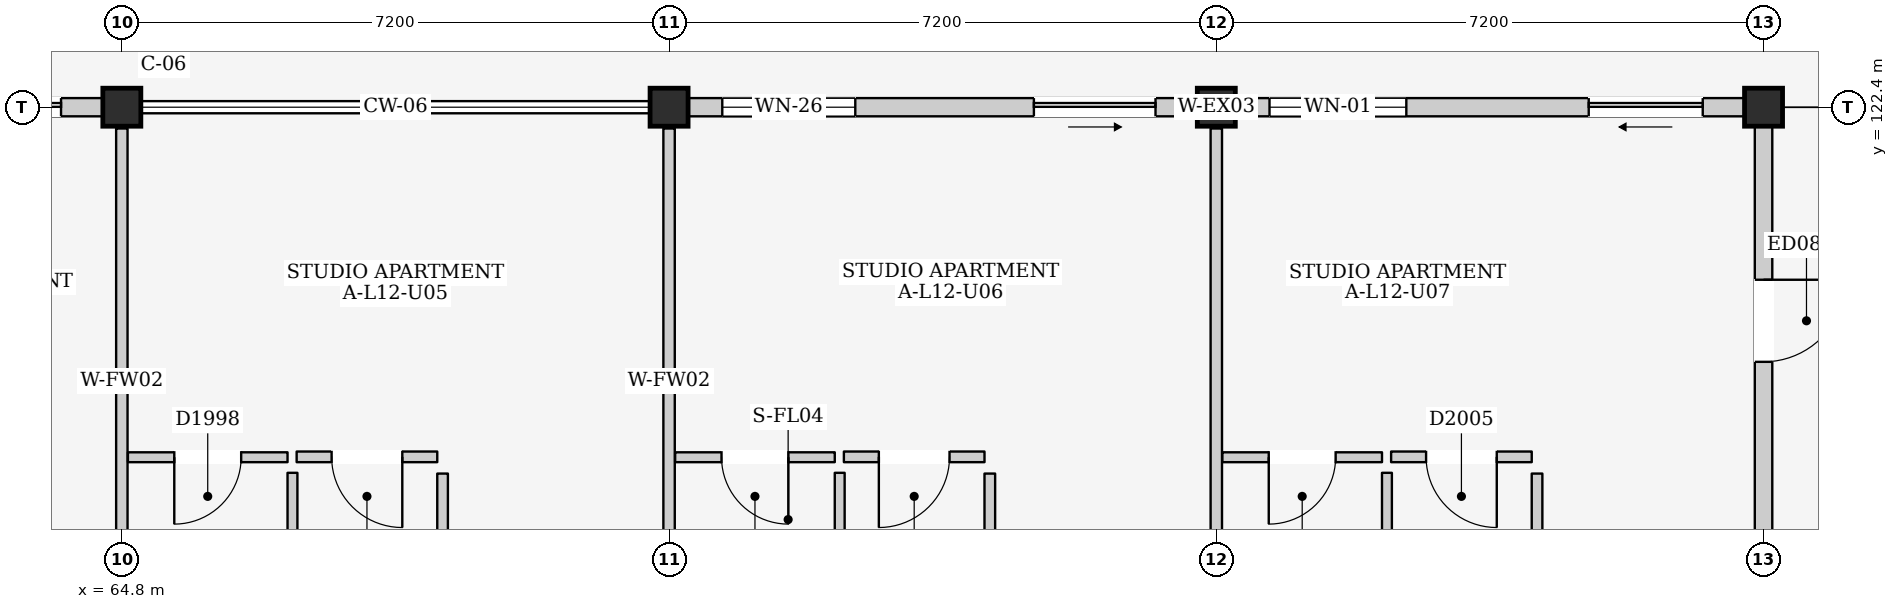
"""IFC4 building model, lengths in metres.
Left out: names, types, materials, properties, quantities, classifications, styles, units other than length and angle.
Written with IfcOpenShell. Run it as: python <this file> out.ifc"""

import sys

from ifc_helpers import new_model, si_unit, direction, frame, frame_2d, origin, origin_2d, place, context, subcontext, project, spatial, rectangle, extrude, element, fill, save


model = new_model("IFC4")
c1 = context("Model", 3, precision=1e-05, world=origin(), true_north=direction((0.0, 1.0)))
c2 = subcontext(c1, "Body", "Model", "MODEL_VIEW")
j1 = project(units=[si_unit("LENGTHUNIT", "METRE"), si_unit("PLANEANGLEUNIT", "RADIAN")], contexts=[c1])
p1 = place(None, origin())
s1 = spatial("IfcSite", under=j1, at=p1, CompositionType="ELEMENT")
p2 = place(p1, origin())
s2 = spatial("IfcBuilding", under=s1, at=p2, CompositionType="ELEMENT")
p3 = place(p2, frame((0.0, 0.0, 41.2)))
s3 = spatial("IfcBuildingStorey", under=s2, at=p3, CompositionType="ELEMENT", Elevation=41.2)
for number, where, z_axis, x_axis in (
    (1, (64.8, 122.4, 0.0), (0.0, 0.0, 1.0), (1.0, 0.0, 0.0)),
    (2, (72.0, 122.4, 0.0), (0.0, 0.0, 1.0), (1.0, 0.0, 0.0)),
    (3, (79.2, 122.4, 0.0), (0.0, 0.0, 1.0), (1.0, 0.0, 0.0)),
    (4, (86.4, 122.4, 0.0), (0.0, 0.0, 1.0), (1.0, 0.0, 0.0)),
):
    element("IfcColumn", number, at=place(p3, frame(where, z_axis=z_axis, x_axis=x_axis)), inside=s3, PredefinedType="COLUMN", context=c2, shape_type="SweptSolid", body=[
        extrude(rectangle(XDim=0.5, YDim=0.5, at=origin_2d()), origin(), (0.0, 0.0, 1.0), 3.2),
    ])
p4 = place(p3, frame((57.85, 122.4, 0.0), z_axis=(0.0, 0.0, 1.0), x_axis=(1.0, 0.0, 0.0)))
e5 = element("IfcWall", 5, at=p4, inside=s3, PredefinedType="ELEMENTEDWALL", context=c2, shape_type="SweptSolid", body=[
    extrude(rectangle(XDim=6.7, YDim=0.24, at=frame_2d((3.35, 0.0))), origin(), (0.0, 0.0, 1.0), 2.485),
])
p5 = place(p4, frame((4.75, 0.0, 0.0)))
e6 = element("IfcOpeningElement", 6, at=p5, cuts=e5, PredefinedType="OPENING", context=c2, shape_type="SweptSolid", body=[
    extrude(rectangle(XDim=1.4, YDim=2.1, at=frame_2d((0.7, 1.05))), frame((0.0, 0.135, 0.0), z_axis=(0.0, -1.0, 0.0), x_axis=(1.0, 0.0, 0.0)), (0.0, 0.0, 1.0), 0.27),
])
p6 = place(p4, frame((0.45, 0.0, 0.9)))
e7 = element("IfcOpeningElement", 7, at=p6, cuts=e5, PredefinedType="OPENING", context=c2, shape_type="SweptSolid", body=[
    extrude(rectangle(XDim=1.3, YDim=1.25, at=frame_2d((0.65, 0.625))), frame((0.0, 0.135, 0.0), z_axis=(0.0, -1.0, 0.0), x_axis=(1.0, 0.0, 0.0)), (0.0, 0.0, 1.0), 0.27),
])
p7 = place(p3, frame((72.25, 122.4, 0.0), z_axis=(0.0, 0.0, 1.0), x_axis=(1.0, 0.0, 0.0)))
e8 = element("IfcWall", 8, at=p7, inside=s3, PredefinedType="ELEMENTEDWALL", context=c2, shape_type="SweptSolid", body=[
    extrude(rectangle(XDim=6.7, YDim=0.24, at=frame_2d((3.35, 0.0))), origin(), (0.0, 0.0, 1.0), 2.485),
])
p8 = place(p7, frame((4.55, 0.0, 0.0)))
e9 = element("IfcOpeningElement", 9, at=p8, cuts=e8, PredefinedType="OPENING", context=c2, shape_type="SweptSolid", body=[
    extrude(rectangle(XDim=1.6, YDim=2.12, at=frame_2d((0.8, 1.06))), frame((0.0, 0.135, 0.0), z_axis=(0.0, -1.0, 0.0), x_axis=(1.0, 0.0, 0.0)), (0.0, 0.0, 1.0), 0.27),
])
p9 = place(p7, frame((0.45, 0.0, 0.825)))
e10 = element("IfcOpeningElement", 10, at=p9, cuts=e8, PredefinedType="OPENING", context=c2, shape_type="SweptSolid", body=[
    extrude(rectangle(XDim=1.75, YDim=1.55, at=frame_2d((0.875, 0.775))), frame((0.0, 0.135, 0.0), z_axis=(0.0, -1.0, 0.0), x_axis=(1.0, 0.0, 0.0)), (0.0, 0.0, 1.0), 0.27),
])
p10 = place(p3, frame((79.45, 122.4, 0.0), z_axis=(0.0, 0.0, 1.0), x_axis=(1.0, 0.0, 0.0)))
e11 = element("IfcWall", 11, at=p10, inside=s3, PredefinedType="ELEMENTEDWALL", context=c2, shape_type="SweptSolid", body=[
    extrude(rectangle(XDim=6.7, YDim=0.24, at=frame_2d((3.35, 0.0))), origin(), (0.0, 0.0, 1.0), 2.485),
])
p11 = place(p10, frame((4.65, 0.0, 0.0)))
e12 = element("IfcOpeningElement", 12, at=p11, cuts=e11, PredefinedType="OPENING", context=c2, shape_type="SweptSolid", body=[
    extrude(rectangle(XDim=1.5, YDim=2.12, at=frame_2d((0.75, 1.06))), frame((0.0, 0.135, 0.0), z_axis=(0.0, -1.0, 0.0), x_axis=(1.0, 0.0, 0.0)), (0.0, 0.0, 1.0), 0.27),
])
p12 = place(p10, frame((0.45, 0.0, 0.875)))
e13 = element("IfcOpeningElement", 13, at=p12, cuts=e11, PredefinedType="OPENING", context=c2, shape_type="SweptSolid", body=[
    extrude(rectangle(XDim=1.8, YDim=1.5, at=frame_2d((0.9, 0.75))), frame((0.0, 0.135, 0.0), z_axis=(0.0, -1.0, 0.0), x_axis=(1.0, 0.0, 0.0)), (0.0, 0.0, 1.0), 0.27),
])
p13 = place(p3, frame((86.4, 115.45, 0.0), z_axis=(0.0, 0.0, 1.0), x_axis=(0.0, 1.0, 0.0)))
e14 = element("IfcWall", 14, at=p13, inside=s3, PredefinedType="ELEMENTEDWALL", context=c2, shape_type="SweptSolid", body=[
    extrude(rectangle(XDim=6.7, YDim=0.23, at=frame_2d((3.35, 0.0))), origin(), (0.0, 0.0, 1.0), 2.435),
])
p14 = place(p13, frame((3.6, 0.0, 0.0)))
e15 = element("IfcOpeningElement", 15, at=p14, cuts=e14, PredefinedType="OPENING", context=c2, shape_type="SweptSolid", body=[
    extrude(rectangle(XDim=1.08, YDim=2.12, at=frame_2d((0.54, 1.06))), frame((0.0, 0.13, 0.0), z_axis=(0.0, -1.0, 0.0), x_axis=(1.0, 0.0, 0.0)), (0.0, 0.0, 1.0), 0.26),
])
for number, where, z_axis, x_axis in (
    (16, (64.8, 115.48, 0.0), (0.0, 0.0, 1.0), (0.0, 1.0, 0.0)),
    (17, (72.0, 115.48, 0.0), (0.0, 0.0, 1.0), (0.0, 1.0, 0.0)),
):
    element("IfcWall", number, at=place(p3, frame(where, z_axis=z_axis, x_axis=x_axis)), inside=s3, PredefinedType="PARTITIONING", context=c2, shape_type="SweptSolid", body=[
        extrude(rectangle(XDim=6.64, YDim=0.15, at=frame_2d((3.32, 0.0))), origin(), (0.0, 0.0, 1.0), 2.435),
    ])
p15 = place(p3, frame((64.88, 117.795, 0.0), z_axis=(0.0, 0.0, 1.0), x_axis=(1.0, 0.0, 0.0)))
e18 = element("IfcWall", 18, at=p15, inside=s3, PredefinedType="PARTITIONING", context=c2, shape_type="SweptSolid", body=[
    extrude(rectangle(XDim=2.1, YDim=0.13, at=frame_2d((1.05, 0.0))), origin(), (0.0, 0.0, 1.0), 2.95),
])
p16 = place(p15, frame((0.61, 0.0, 0.0)))
e19 = element("IfcOpeningElement", 19, at=p16, cuts=e18, PredefinedType="OPENING", context=c2, shape_type="SweptSolid", body=[
    extrude(rectangle(XDim=0.88, YDim=2.1, at=frame_2d((0.44, 1.05))), frame((0.0, 0.08, 0.0), z_axis=(0.0, -1.0, 0.0), x_axis=(1.0, 0.0, 0.0)), (0.0, 0.0, 1.0), 0.16),
])
p17 = place(p3, frame((67.045, 115.46, 0.0), z_axis=(0.0, 0.0, 1.0), x_axis=(0.0, 1.0, 0.0)))
e20 = element("IfcWall", 20, at=p17, inside=s3, PredefinedType="PARTITIONING", context=c2, shape_type="SweptSolid", body=[
    extrude(rectangle(XDim=2.13, YDim=0.13, at=frame_2d((1.065, 0.0))), origin(), (0.0, 0.0, 1.0), 2.95),
])
p18 = place(p3, frame((67.1, 117.8, 0.0), z_axis=(0.0, 0.0, 1.0), x_axis=(1.0, 0.0, 0.0)))
e21 = element("IfcWall", 21, at=p18, inside=s3, PredefinedType="PARTITIONING", context=c2, shape_type="SweptSolid", body=[
    extrude(rectangle(XDim=1.85, YDim=0.14, at=frame_2d((0.925, 0.0))), origin(), (0.0, 0.0, 1.0), 2.95),
])
p19 = place(p18, frame((0.46, 0.0, 0.0)))
e22 = element("IfcOpeningElement", 22, at=p19, cuts=e21, PredefinedType="OPENING", context=c2, shape_type="SweptSolid", body=[
    extrude(rectangle(XDim=0.93, YDim=2.14, at=frame_2d((0.465, 1.07))), frame((0.0, 0.085, 0.0), z_axis=(0.0, -1.0, 0.0), x_axis=(1.0, 0.0, 0.0)), (0.0, 0.0, 1.0), 0.17),
])
p20 = place(p3, frame((69.02, 115.43, 0.0), z_axis=(0.0, 0.0, 1.0), x_axis=(0.0, 1.0, 0.0)))
e23 = element("IfcWall", 23, at=p20, inside=s3, PredefinedType="PARTITIONING", context=c2, shape_type="SweptSolid", body=[
    extrude(rectangle(XDim=2.15, YDim=0.14, at=frame_2d((1.075, 0.0))), origin(), (0.0, 0.0, 1.0), 2.95),
])
p21 = place(p3, frame((79.2, 115.48, 0.0), z_axis=(0.0, 0.0, 1.0), x_axis=(0.0, 1.0, 0.0)))
e24 = element("IfcWall", 24, at=p21, inside=s3, PredefinedType="PARTITIONING", context=c2, shape_type="SweptSolid", body=[
    extrude(rectangle(XDim=6.64, YDim=0.15, at=frame_2d((3.32, 0.0))), origin(), (0.0, 0.0, 1.0), 2.435),
])
p22 = place(p3, frame((72.08, 117.795, 0.0), z_axis=(0.0, 0.0, 1.0), x_axis=(1.0, 0.0, 0.0)))
e25 = element("IfcWall", 25, at=p22, inside=s3, PredefinedType="PARTITIONING", context=c2, shape_type="SweptSolid", body=[
    extrude(rectangle(XDim=2.1, YDim=0.13, at=frame_2d((1.05, 0.0))), origin(), (0.0, 0.0, 1.0), 2.95),
])
p23 = place(p22, frame((0.61, 0.0, 0.0)))
e26 = element("IfcOpeningElement", 26, at=p23, cuts=e25, PredefinedType="OPENING", context=c2, shape_type="SweptSolid", body=[
    extrude(rectangle(XDim=0.88, YDim=2.1, at=frame_2d((0.44, 1.05))), frame((0.0, 0.08, 0.0), z_axis=(0.0, -1.0, 0.0), x_axis=(1.0, 0.0, 0.0)), (0.0, 0.0, 1.0), 0.16),
])
p24 = place(p3, frame((74.245, 115.46, 0.0), z_axis=(0.0, 0.0, 1.0), x_axis=(0.0, 1.0, 0.0)))
e27 = element("IfcWall", 27, at=p24, inside=s3, PredefinedType="PARTITIONING", context=c2, shape_type="SweptSolid", body=[
    extrude(rectangle(XDim=2.13, YDim=0.13, at=frame_2d((1.065, 0.0))), origin(), (0.0, 0.0, 1.0), 2.95),
])
p25 = place(p3, frame((74.3, 117.8, 0.0), z_axis=(0.0, 0.0, 1.0), x_axis=(1.0, 0.0, 0.0)))
e28 = element("IfcWall", 28, at=p25, inside=s3, PredefinedType="PARTITIONING", context=c2, shape_type="SweptSolid", body=[
    extrude(rectangle(XDim=1.85, YDim=0.14, at=frame_2d((0.925, 0.0))), origin(), (0.0, 0.0, 1.0), 2.95),
])
p26 = place(p25, frame((0.46, 0.0, 0.0)))
e29 = element("IfcOpeningElement", 29, at=p26, cuts=e28, PredefinedType="OPENING", context=c2, shape_type="SweptSolid", body=[
    extrude(rectangle(XDim=0.93, YDim=2.14, at=frame_2d((0.465, 1.07))), frame((0.0, 0.085, 0.0), z_axis=(0.0, -1.0, 0.0), x_axis=(1.0, 0.0, 0.0)), (0.0, 0.0, 1.0), 0.17),
])
p27 = place(p3, frame((76.22, 115.43, 0.0), z_axis=(0.0, 0.0, 1.0), x_axis=(0.0, 1.0, 0.0)))
e30 = element("IfcWall", 30, at=p27, inside=s3, PredefinedType="PARTITIONING", context=c2, shape_type="SweptSolid", body=[
    extrude(rectangle(XDim=2.15, YDim=0.14, at=frame_2d((1.075, 0.0))), origin(), (0.0, 0.0, 1.0), 2.95),
])
p28 = place(p3, frame((79.28, 117.795, 0.0), z_axis=(0.0, 0.0, 1.0), x_axis=(1.0, 0.0, 0.0)))
e31 = element("IfcWall", 31, at=p28, inside=s3, PredefinedType="PARTITIONING", context=c2, shape_type="SweptSolid", body=[
    extrude(rectangle(XDim=2.1, YDim=0.13, at=frame_2d((1.05, 0.0))), origin(), (0.0, 0.0, 1.0), 2.95),
])
p29 = place(p28, frame((0.61, 0.0, 0.0)))
e32 = element("IfcOpeningElement", 32, at=p29, cuts=e31, PredefinedType="OPENING", context=c2, shape_type="SweptSolid", body=[
    extrude(rectangle(XDim=0.88, YDim=2.1, at=frame_2d((0.44, 1.05))), frame((0.0, 0.08, 0.0), z_axis=(0.0, -1.0, 0.0), x_axis=(1.0, 0.0, 0.0)), (0.0, 0.0, 1.0), 0.16),
])
p30 = place(p3, frame((81.445, 115.46, 0.0), z_axis=(0.0, 0.0, 1.0), x_axis=(0.0, 1.0, 0.0)))
e33 = element("IfcWall", 33, at=p30, inside=s3, PredefinedType="PARTITIONING", context=c2, shape_type="SweptSolid", body=[
    extrude(rectangle(XDim=2.13, YDim=0.13, at=frame_2d((1.065, 0.0))), origin(), (0.0, 0.0, 1.0), 2.95),
])
p31 = place(p3, frame((81.5, 117.8, 0.0), z_axis=(0.0, 0.0, 1.0), x_axis=(1.0, 0.0, 0.0)))
e34 = element("IfcWall", 34, at=p31, inside=s3, PredefinedType="PARTITIONING", context=c2, shape_type="SweptSolid", body=[
    extrude(rectangle(XDim=1.85, YDim=0.14, at=frame_2d((0.925, 0.0))), origin(), (0.0, 0.0, 1.0), 2.95),
])
p32 = place(p31, frame((0.46, 0.0, 0.0)))
e35 = element("IfcOpeningElement", 35, at=p32, cuts=e34, PredefinedType="OPENING", context=c2, shape_type="SweptSolid", body=[
    extrude(rectangle(XDim=0.93, YDim=2.14, at=frame_2d((0.465, 1.07))), frame((0.0, 0.085, 0.0), z_axis=(0.0, -1.0, 0.0), x_axis=(1.0, 0.0, 0.0)), (0.0, 0.0, 1.0), 0.17),
])
p33 = place(p3, frame((83.42, 115.43, 0.0), z_axis=(0.0, 0.0, 1.0), x_axis=(0.0, 1.0, 0.0)))
e36 = element("IfcWall", 36, at=p33, inside=s3, PredefinedType="PARTITIONING", context=c2, shape_type="SweptSolid", body=[
    extrude(rectangle(XDim=2.15, YDim=0.14, at=frame_2d((1.075, 0.0))), origin(), (0.0, 0.0, 1.0), 2.95),
])
p34 = place(p5, frame((1.4, 0.0, 0.0), z_axis=(0.0, 0.0, 1.0), x_axis=(-1.0, 0.0, 0.0)))
e37 = element("IfcDoor", 37, at=p34, inside=s3, OperationType="SLIDING_TO_RIGHT", PredefinedType="DOOR", context=c2, shape_type="SweptSolid", body=[
    extrude(rectangle(XDim=1.4, YDim=2.1, at=frame_2d((0.7, 1.05))), frame((0.0, 0.025, 0.0), z_axis=(0.0, -1.0, 0.0), x_axis=(1.0, 0.0, 0.0)), (0.0, 0.0, 1.0), 0.05),
])
fill(e6, e37)
p35 = place(p8, frame((1.6, 0.0, 0.0), z_axis=(0.0, 0.0, 1.0), x_axis=(-1.0, 0.0, 0.0)))
e38 = element("IfcDoor", 38, at=p35, inside=s3, OperationType="SLIDING_TO_RIGHT", PredefinedType="DOOR", context=c2, shape_type="SweptSolid", body=[
    extrude(rectangle(XDim=1.6, YDim=2.12, at=frame_2d((0.8, 1.06))), frame((0.0, 0.025, 0.0), z_axis=(0.0, -1.0, 0.0), x_axis=(1.0, 0.0, 0.0)), (0.0, 0.0, 1.0), 0.05),
])
fill(e9, e38)
p36 = place(p9, origin())
e39 = element("IfcWindow", 39, at=p36, inside=s3, PartitioningType="DOUBLE_PANEL_VERTICAL", PredefinedType="WINDOW", context=c2, shape_type="SweptSolid", body=[
    extrude(rectangle(XDim=1.75, YDim=1.55, at=frame_2d((0.875, 0.775))), frame((0.0, 0.03, 0.0), z_axis=(0.0, -1.0, 0.0), x_axis=(1.0, 0.0, 0.0)), (0.0, 0.0, 1.0), 0.06),
])
fill(e10, e39)
p37 = place(p11, frame((1.5, 0.0, 0.0), z_axis=(0.0, 0.0, 1.0), x_axis=(-1.0, 0.0, 0.0)))
e40 = element("IfcDoor", 40, at=p37, inside=s3, OperationType="SLIDING_TO_LEFT", PredefinedType="DOOR", context=c2, shape_type="SweptSolid", body=[
    extrude(rectangle(XDim=1.5, YDim=2.12, at=frame_2d((0.75, 1.06))), frame((0.0, 0.025, 0.0), z_axis=(0.0, -1.0, 0.0), x_axis=(1.0, 0.0, 0.0)), (0.0, 0.0, 1.0), 0.05),
])
fill(e12, e40)
p38 = place(p12, origin())
e41 = element("IfcWindow", 41, at=p38, inside=s3, PartitioningType="DOUBLE_PANEL_VERTICAL", PredefinedType="WINDOW", context=c2, shape_type="SweptSolid", body=[
    extrude(rectangle(XDim=1.8, YDim=1.5, at=frame_2d((0.9, 0.75))), frame((0.0, 0.03, 0.0), z_axis=(0.0, -1.0, 0.0), x_axis=(1.0, 0.0, 0.0)), (0.0, 0.0, 1.0), 0.06),
])
fill(e13, e41)
p39 = place(p14, frame((1.08, 0.0, 0.0), z_axis=(0.0, 0.0, 1.0), x_axis=(-1.0, 0.0, 0.0)))
e42 = element("IfcDoor", 42, at=p39, inside=s3, OperationType="SINGLE_SWING_LEFT", PredefinedType="DOOR", context=c2, shape_type="SweptSolid", body=[
    extrude(rectangle(XDim=1.08, YDim=2.12, at=frame_2d((0.54, 1.06))), frame((0.0, 0.025, 0.0), z_axis=(0.0, -1.0, 0.0), x_axis=(1.0, 0.0, 0.0)), (0.0, 0.0, 1.0), 0.05),
])
fill(e15, e42)
p40 = place(p16, frame((0.88, 0.0, 0.0), z_axis=(0.0, 0.0, 1.0), x_axis=(-1.0, 0.0, 0.0)))
e43 = element("IfcDoor", 43, at=p40, inside=s3, OperationType="SINGLE_SWING_RIGHT", PredefinedType="DOOR", context=c2, shape_type="SweptSolid", body=[
    extrude(rectangle(XDim=0.88, YDim=2.1, at=frame_2d((0.44, 1.05))), frame((0.0, 0.025, 0.0), z_axis=(0.0, -1.0, 0.0), x_axis=(1.0, 0.0, 0.0)), (0.0, 0.0, 1.0), 0.05),
])
fill(e19, e43)
p41 = place(p19, frame((0.93, 0.0, 0.0), z_axis=(0.0, 0.0, 1.0), x_axis=(-1.0, 0.0, 0.0)))
e44 = element("IfcDoor", 44, at=p41, inside=s3, OperationType="SINGLE_SWING_LEFT", PredefinedType="DOOR", context=c2, shape_type="SweptSolid", body=[
    extrude(rectangle(XDim=0.93, YDim=2.14, at=frame_2d((0.465, 1.07))), frame((0.0, 0.025, 0.0), z_axis=(0.0, -1.0, 0.0), x_axis=(1.0, 0.0, 0.0)), (0.0, 0.0, 1.0), 0.05),
])
fill(e22, e44)
p42 = place(p23, frame((0.88, 0.0, 0.0), z_axis=(0.0, 0.0, 1.0), x_axis=(-1.0, 0.0, 0.0)))
e45 = element("IfcDoor", 45, at=p42, inside=s3, OperationType="SINGLE_SWING_LEFT", PredefinedType="DOOR", context=c2, shape_type="SweptSolid", body=[
    extrude(rectangle(XDim=0.88, YDim=2.1, at=frame_2d((0.44, 1.05))), frame((0.0, 0.025, 0.0), z_axis=(0.0, -1.0, 0.0), x_axis=(1.0, 0.0, 0.0)), (0.0, 0.0, 1.0), 0.05),
])
fill(e26, e45)
p43 = place(p26, frame((0.93, 0.0, 0.0), z_axis=(0.0, 0.0, 1.0), x_axis=(-1.0, 0.0, 0.0)))
e46 = element("IfcDoor", 46, at=p43, inside=s3, OperationType="SINGLE_SWING_RIGHT", PredefinedType="DOOR", context=c2, shape_type="SweptSolid", body=[
    extrude(rectangle(XDim=0.93, YDim=2.14, at=frame_2d((0.465, 1.07))), frame((0.0, 0.025, 0.0), z_axis=(0.0, -1.0, 0.0), x_axis=(1.0, 0.0, 0.0)), (0.0, 0.0, 1.0), 0.05),
])
fill(e29, e46)
p44 = place(p29, frame((0.88, 0.0, 0.0), z_axis=(0.0, 0.0, 1.0), x_axis=(-1.0, 0.0, 0.0)))
e47 = element("IfcDoor", 47, at=p44, inside=s3, OperationType="SINGLE_SWING_RIGHT", PredefinedType="DOOR", context=c2, shape_type="SweptSolid", body=[
    extrude(rectangle(XDim=0.88, YDim=2.1, at=frame_2d((0.44, 1.05))), frame((0.0, 0.025, 0.0), z_axis=(0.0, -1.0, 0.0), x_axis=(1.0, 0.0, 0.0)), (0.0, 0.0, 1.0), 0.05),
])
fill(e32, e47)
p45 = place(p32, frame((0.93, 0.0, 0.0), z_axis=(0.0, 0.0, 1.0), x_axis=(-1.0, 0.0, 0.0)))
e48 = element("IfcDoor", 48, at=p45, inside=s3, OperationType="SINGLE_SWING_LEFT", PredefinedType="DOOR", context=c2, shape_type="SweptSolid", body=[
    extrude(rectangle(XDim=0.93, YDim=2.14, at=frame_2d((0.465, 1.07))), frame((0.0, 0.025, 0.0), z_axis=(0.0, -1.0, 0.0), x_axis=(1.0, 0.0, 0.0)), (0.0, 0.0, 1.0), 0.05),
])
fill(e35, e48)
save(model, sys.argv[1])
